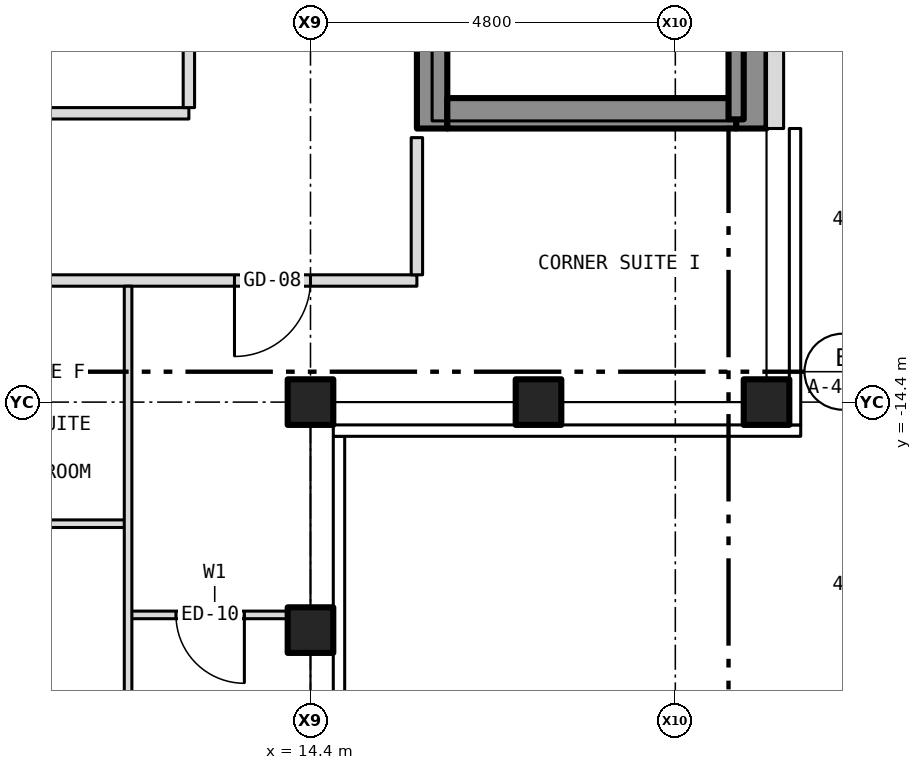
"""IFC4 building model, lengths in metres.
Left out: names, types, materials, properties, quantities, classifications, styles, units other than length and angle.
Written with IfcOpenShell. Run it as: python <this file> out.ifc"""

import sys

from ifc_helpers import new_model, si_unit, direction, frame, frame_2d, origin, origin_2d, place, context, subcontext, project, spatial, rectangle, hollow_rectangle, extrude, element, fill, save


model = new_model("IFC4")
c1 = context("Model", 3, precision=1e-05, world=origin(), true_north=direction((0.0, 1.0)))
c2 = subcontext(c1, "Body", "Model", "MODEL_VIEW")
j1 = project(units=[si_unit("LENGTHUNIT", "METRE"), si_unit("PLANEANGLEUNIT", "RADIAN")], contexts=[c1])
p1 = place(None, origin())
s1 = spatial("IfcSite", under=j1, at=p1, CompositionType="ELEMENT")
p2 = place(p1, origin())
s2 = spatial("IfcBuilding", under=s1, at=p2, CompositionType="ELEMENT")
p3 = place(p2, frame((0.0, 0.0, 248.0)))
s3 = spatial("IfcBuildingStorey", under=s2, at=p3, CompositionType="ELEMENT", Elevation=248.0)
for number, where, z_axis, x_axis in (
    (1, (20.4, -14.4, -0.15), (0.0, 0.0, 1.0), (1.0, 0.0, 0.0)),
    (2, (14.4, -14.4, -0.15), (0.0, 0.0, 1.0), (1.0, 0.0, 0.0)),
    (3, (14.4, -17.4, -0.15), (0.0, 0.0, 1.0), (1.0, 0.0, 0.0)),
    (4, (17.4, -14.4, -0.15), (0.0, 0.0, 1.0), (1.0, 0.0, 0.0)),
):
    element("IfcColumn", number, at=place(p3, frame(where, z_axis=z_axis, x_axis=x_axis)), inside=s3, PredefinedType="COLUMN", context=c2, shape_type="SweptSolid", body=[
        extrude(hollow_rectangle(XDim=0.6, YDim=0.6, WallThickness=0.03, at=origin_2d()), origin(), (0.0, 0.0, 1.0), 3.5),
    ])
p4 = place(p3, frame((16.0, -10.8, 0.0), z_axis=(0.0, 0.0, 1.0), x_axis=(0.0, 1.0, 0.0)))
e5 = element("IfcWall", 5, at=p4, inside=s3, PredefinedType="SHEAR", context=c2, shape_type="SweptSolid", body=[
    extrude(rectangle(XDim=21.6, YDim=0.4, at=frame_2d((10.8, 0.0))), origin(), (0.0, 0.0, 1.0), 3.25),
])
p5 = place(p4, frame((9.4, 0.0, 0.0)))
e6 = element("IfcOpeningElement", 6, at=p5, cuts=e5, PredefinedType="OPENING", context=c2, shape_type="SweptSolid", body=[
    extrude(rectangle(XDim=1.1, YDim=2.1, at=frame_2d((0.55, 1.05))), frame((0.0, 0.212, 0.0), z_axis=(0.0, -1.0, 0.0), x_axis=(1.0, 0.0, 0.0)), (0.0, 0.0, 1.0), 0.424),
])
p6 = place(p4, frame((11.5, 0.0, 0.0)))
e7 = element("IfcOpeningElement", 7, at=p6, cuts=e5, PredefinedType="OPENING", context=c2, shape_type="SweptSolid", body=[
    extrude(rectangle(XDim=1.1, YDim=2.1, at=frame_2d((0.55, 1.05))), frame((0.0, 0.212, 0.0), z_axis=(0.0, -1.0, 0.0), x_axis=(1.0, 0.0, 0.0)), (0.0, 0.0, 1.0), 0.424),
])
p7 = place(p4, frame((13.6, 0.0, 0.0)))
e8 = element("IfcOpeningElement", 8, at=p7, cuts=e5, PredefinedType="OPENING", context=c2, shape_type="SweptSolid", body=[
    extrude(rectangle(XDim=1.1, YDim=2.1, at=frame_2d((0.55, 1.05))), frame((0.0, 0.212, 0.0), z_axis=(0.0, -1.0, 0.0), x_axis=(1.0, 0.0, 0.0)), (0.0, 0.0, 1.0), 0.424),
])
p8 = place(p4, frame((15.7, 0.0, 0.0)))
e9 = element("IfcOpeningElement", 9, at=p8, cuts=e5, PredefinedType="OPENING", context=c2, shape_type="SweptSolid", body=[
    extrude(rectangle(XDim=1.1, YDim=2.1, at=frame_2d((0.55, 1.05))), frame((0.0, 0.212, 0.0), z_axis=(0.0, -1.0, 0.0), x_axis=(1.0, 0.0, 0.0)), (0.0, 0.0, 1.0), 0.424),
])
p9 = place(p4, frame((17.8, 0.0, 0.0)))
e10 = element("IfcOpeningElement", 10, at=p9, cuts=e5, PredefinedType="OPENING", context=c2, shape_type="SweptSolid", body=[
    extrude(rectangle(XDim=1.1, YDim=2.1, at=frame_2d((0.55, 1.05))), frame((0.0, 0.212, 0.0), z_axis=(0.0, -1.0, 0.0), x_axis=(1.0, 0.0, 0.0)), (0.0, 0.0, 1.0), 0.424),
])
p10 = place(p4, frame((5.642, 0.0, 0.0)))
e11 = element("IfcOpeningElement", 11, at=p10, cuts=e5, PredefinedType="OPENING", context=c2, shape_type="SweptSolid", body=[
    extrude(rectangle(XDim=1.1, YDim=2.1, at=frame_2d((0.55, 1.05))), frame((0.0, 0.212, 0.0), z_axis=(0.0, -1.0, 0.0), x_axis=(1.0, 0.0, 0.0)), (0.0, 0.0, 1.0), 0.424),
])
p11 = place(p4, frame((7.5, 0.0, 0.0)))
e12 = element("IfcOpeningElement", 12, at=p11, cuts=e5, PredefinedType="OPENING", context=c2, shape_type="SweptSolid", body=[
    extrude(rectangle(XDim=1.1, YDim=2.1, at=frame_2d((0.55, 1.05))), frame((0.0, 0.212, 0.0), z_axis=(0.0, -1.0, 0.0), x_axis=(1.0, 0.0, 0.0)), (0.0, 0.0, 1.0), 0.424),
])
p12 = place(p4, frame((20.0, 0.0, 0.0)))
e13 = element("IfcOpeningElement", 13, at=p12, cuts=e5, PredefinedType="OPENING", context=c2, shape_type="SweptSolid", body=[
    extrude(rectangle(XDim=0.9, YDim=2.1, at=frame_2d((0.45, 1.05))), frame((0.0, 0.212, 0.0), z_axis=(0.0, -1.0, 0.0), x_axis=(1.0, 0.0, 0.0)), (0.0, 0.0, 1.0), 0.424),
])
p13 = place(p3, frame((20.2, -10.8, 0.0), z_axis=(0.0, 0.0, 1.0), x_axis=(0.0, 1.0, 0.0)))
e14 = element("IfcWall", 14, at=p13, inside=s3, PredefinedType="SHEAR", context=c2, shape_type="SweptSolid", body=[
    extrude(rectangle(XDim=21.6, YDim=0.4, at=frame_2d((10.8, 0.0))), origin(), (0.0, 0.0, 1.0), 3.25),
])
p14 = place(p3, frame((16.2, -10.6, 0.0), z_axis=(0.0, 0.0, 1.0), x_axis=(1.0, 0.0, 0.0)))
e15 = element("IfcWall", 15, at=p14, inside=s3, PredefinedType="SHEAR", context=c2, shape_type="SweptSolid", body=[
    extrude(rectangle(XDim=3.8, YDim=0.4, at=frame_2d((1.9, 0.0))), origin(), (0.0, 0.0, 1.0), 3.25),
])
p15 = place(p3, frame((20.512, -10.8, 0.0), z_axis=(0.0, 0.0, 1.0), x_axis=(0.0, 1.0, 0.0)))
e16 = element("IfcWall", 16, at=p15, inside=s3, PredefinedType="SOLIDWALL", context=c2, shape_type="SweptSolid", body=[
    extrude(rectangle(XDim=21.6, YDim=0.225, at=frame_2d((10.8, 0.0))), origin(), (0.0, 0.0, 1.0), 3.5),
])
p16 = place(p15, frame((2.95, 0.0, 1.0)))
e17 = element("IfcOpeningElement", 17, at=p16, cuts=e16, PredefinedType="OPENING", context=c2, shape_type="SweptSolid", body=[
    extrude(rectangle(XDim=0.6, YDim=1.5, at=frame_2d((0.3, 0.75))), frame((0.0, 0.125, 0.0), z_axis=(0.0, -1.0, 0.0), x_axis=(1.0, 0.0, 0.0)), (0.0, 0.0, 1.0), 0.249),
])
p17 = place(p3, frame((12.0, -17.2, 0.0), z_axis=(0.0, 0.0, 1.0), x_axis=(1.0, 0.0, 0.0)))
e18 = element("IfcWall", 18, at=p17, inside=s3, PredefinedType="PARTITIONING", context=c2, shape_type="SweptSolid", body=[
    extrude(rectangle(XDim=2.28, YDim=0.1, at=frame_2d((1.14, 0.0))), origin(), (0.0, 0.0, 1.0), 3.35),
])
p18 = place(p17, frame((0.63, 0.0, 0.0)))
e19 = element("IfcOpeningElement", 19, at=p18, cuts=e18, PredefinedType="OPENING", context=c2, shape_type="SweptSolid", body=[
    extrude(rectangle(XDim=0.9, YDim=2.1, at=frame_2d((0.45, 1.05))), frame((0.0, 0.062, 0.0), z_axis=(0.0, -1.0, 0.0), x_axis=(1.0, 0.0, 0.0)), (0.0, 0.0, 1.0), 0.124),
])
p19 = place(p3, frame((9.8, -16.0, 0.0), z_axis=(0.0, 0.0, 1.0), x_axis=(1.0, 0.0, 0.0)))
e20 = element("IfcWall", 20, at=p19, inside=s3, PredefinedType="PARTITIONING", context=c2, shape_type="SweptSolid", body=[
    extrude(rectangle(XDim=2.2, YDim=0.1, at=frame_2d((1.1, 0.0))), origin(), (0.0, 0.0, 1.0), 3.35),
])
p20 = place(p3, frame((-15.8, -12.8, 0.0), z_axis=(0.0, 0.0, 1.0), x_axis=(1.0, 0.0, 0.0)))
e21 = element("IfcWall", 21, at=p20, inside=s3, PredefinedType="PARTITIONING", context=c2, shape_type="SweptSolid", body=[
    extrude(rectangle(XDim=31.6, YDim=0.15, at=frame_2d((15.8, 0.0))), origin(), (0.0, 0.0, 1.0), 3.35),
])
p21 = place(p20, frame((4.6, 0.0, 0.0)))
e22 = element("IfcOpeningElement", 22, at=p21, cuts=e21, PredefinedType="OPENING", context=c2, shape_type="SweptSolid", body=[
    extrude(rectangle(XDim=1.0, YDim=2.1, at=frame_2d((0.5, 1.05))), frame((0.0, 0.087, 0.0), z_axis=(0.0, -1.0, 0.0), x_axis=(1.0, 0.0, 0.0)), (0.0, 0.0, 1.0), 0.174),
])
p22 = place(p20, frame((12.8, 0.0, 0.0)))
e23 = element("IfcOpeningElement", 23, at=p22, cuts=e21, PredefinedType="OPENING", context=c2, shape_type="SweptSolid", body=[
    extrude(rectangle(XDim=1.0, YDim=2.1, at=frame_2d((0.5, 1.05))), frame((0.0, 0.087, 0.0), z_axis=(0.0, -1.0, 0.0), x_axis=(1.0, 0.0, 0.0)), (0.0, 0.0, 1.0), 0.174),
])
p23 = place(p20, frame((18.0, 0.0, 0.0)))
e24 = element("IfcOpeningElement", 24, at=p23, cuts=e21, PredefinedType="OPENING", context=c2, shape_type="SweptSolid", body=[
    extrude(rectangle(XDim=1.0, YDim=2.1, at=frame_2d((0.5, 1.05))), frame((0.0, 0.087, 0.0), z_axis=(0.0, -1.0, 0.0), x_axis=(1.0, 0.0, 0.0)), (0.0, 0.0, 1.0), 0.174),
])
p24 = place(p20, frame((1.4, 0.0, 0.0)))
e25 = element("IfcOpeningElement", 25, at=p24, cuts=e21, PredefinedType="OPENING", context=c2, shape_type="SweptSolid", body=[
    extrude(rectangle(XDim=1.0, YDim=2.1, at=frame_2d((0.5, 1.05))), frame((0.0, 0.087, 0.0), z_axis=(0.0, -1.0, 0.0), x_axis=(1.0, 0.0, 0.0)), (0.0, 0.0, 1.0), 0.174),
])
p25 = place(p20, frame((29.2, 0.0, 0.0)))
e26 = element("IfcOpeningElement", 26, at=p25, cuts=e21, PredefinedType="OPENING", context=c2, shape_type="SweptSolid", body=[
    extrude(rectangle(XDim=1.0, YDim=2.1, at=frame_2d((0.5, 1.05))), frame((0.0, 0.087, 0.0), z_axis=(0.0, -1.0, 0.0), x_axis=(1.0, 0.0, 0.0)), (0.0, 0.0, 1.0), 0.174),
])
p26 = place(p3, frame((9.7, -10.6, 0.0), z_axis=(0.0, 0.0, 1.0), x_axis=(1.0, 0.0, 0.0)))
e27 = element("IfcWall", 27, at=p26, inside=s3, PredefinedType="PARTITIONING", context=c2, shape_type="SweptSolid", body=[
    extrude(rectangle(XDim=3.1, YDim=0.15, at=frame_2d((1.55, 0.0))), origin(), (0.0, 0.0, 1.0), 3.35),
])
p27 = place(p3, frame((12.0, -20.73, 0.0), z_axis=(0.0, 0.0, 1.0), x_axis=(0.0, 1.0, 0.0)))
e28 = element("IfcWall", 28, at=p27, inside=s3, PredefinedType="PARTITIONING", context=c2, shape_type="SweptSolid", body=[
    extrude(rectangle(XDim=7.855, YDim=0.1, at=frame_2d((3.927, 0.0))), origin(), (0.0, 0.0, 1.0), 3.35),
])
p28 = place(p3, frame((12.8, -10.525, 0.0), z_axis=(0.0, 0.0, 1.0), x_axis=(0.0, 1.0, 0.0)))
e29 = element("IfcWall", 29, at=p28, inside=s3, PredefinedType="PARTITIONING", context=c2, shape_type="SweptSolid", body=[
    extrude(rectangle(XDim=8.525, YDim=0.15, at=frame_2d((4.262, 0.0))), origin(), (0.0, 0.0, 1.0), 3.35),
])
p29 = place(p3, frame((15.8, -12.725, 0.0), z_axis=(0.0, 0.0, 1.0), x_axis=(0.0, 1.0, 0.0)))
e30 = element("IfcWall", 30, at=p29, inside=s3, PredefinedType="PARTITIONING", context=c2, shape_type="SweptSolid", body=[
    extrude(rectangle(XDim=1.805, YDim=0.15, at=frame_2d((0.903, 0.0))), origin(), (0.0, 0.0, 1.0), 3.35),
])
p30 = place(p3, frame((20.0, -10.68, 0.0), z_axis=(0.0, 0.0, 1.0), x_axis=(0.0, 1.0, 0.0)))
e31 = element("IfcWall", 31, at=p30, inside=s3, PredefinedType="SHEAR", context=c2, shape_type="SweptSolid", body=[
    extrude(rectangle(XDim=6.98, YDim=0.2, at=frame_2d((3.49, 0.0))), origin(), (0.0, 0.0, 1.0), 3.25),
])
p31 = place(p18, origin())
e32 = element("IfcDoor", 32, at=p31, inside=s3, OperationType="SINGLE_SWING_RIGHT", PredefinedType="DOOR", context=c2, shape_type="SweptSolid", body=[
    extrude(rectangle(XDim=0.9, YDim=2.1, at=frame_2d((0.45, 1.05))), frame((0.0, 0.025, 0.0), z_axis=(0.0, -1.0, 0.0), x_axis=(1.0, 0.0, 0.0)), (0.0, 0.0, 1.0), 0.05),
])
fill(e19, e32)
p32 = place(p25, origin())
e33 = element("IfcDoor", 33, at=p32, inside=s3, OperationType="SINGLE_SWING_LEFT", PredefinedType="DOOR", context=c2, shape_type="SweptSolid", body=[
    extrude(rectangle(XDim=1.0, YDim=2.1, at=frame_2d((0.5, 1.05))), frame((0.0, 0.025, 0.0), z_axis=(0.0, -1.0, 0.0), x_axis=(1.0, 0.0, 0.0)), (0.0, 0.0, 1.0), 0.05),
])
fill(e26, e33)
save(model, sys.argv[1])
